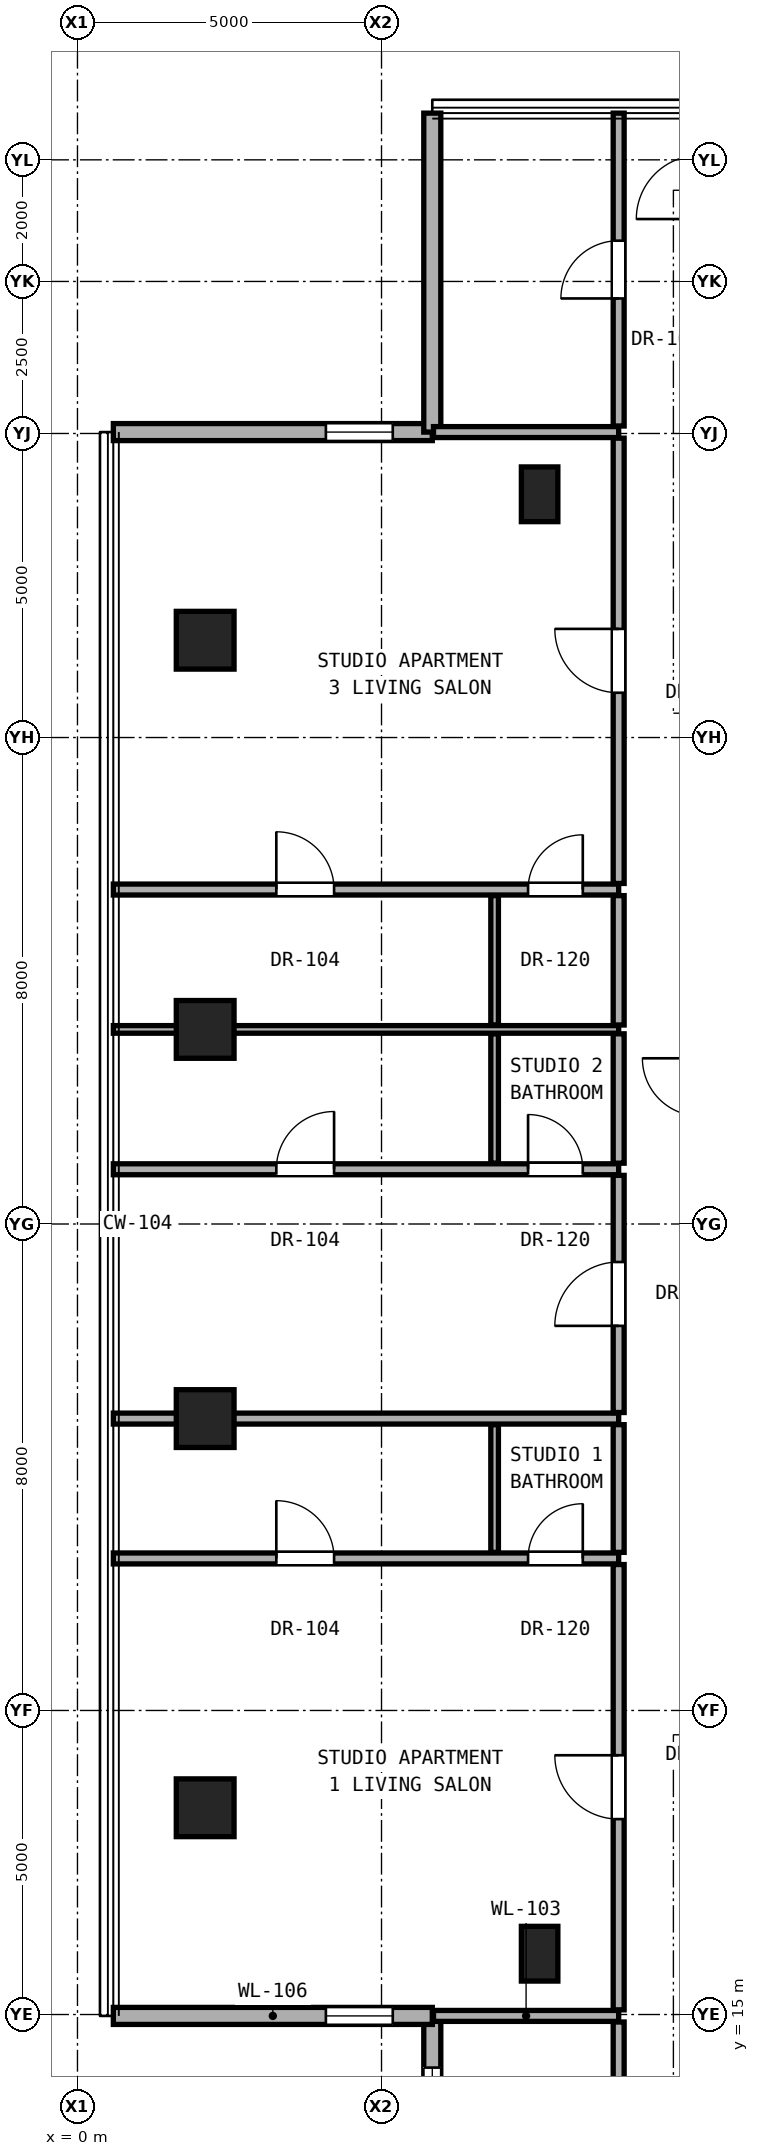
"""IFC4 building model, lengths in metres.
Left out: names, types, materials, properties, quantities, classifications, styles, units other than length and angle.
Written with IfcOpenShell. Run it as: python <this file> out.ifc"""

import sys

from ifc_helpers import new_model, si_unit, direction, frame, frame_2d, origin, origin_2d, place, context, subcontext, project, spatial, rectangle, hollow_rectangle, extrude, element, fill, save


model = new_model("IFC4")
c1 = context("Model", 3, precision=1e-05, world=origin(), true_north=direction((0.0, 1.0)))
c2 = subcontext(c1, "Body", "Model", "MODEL_VIEW")
j1 = project(units=[si_unit("LENGTHUNIT", "METRE"), si_unit("PLANEANGLEUNIT", "RADIAN")], contexts=[c1])
p1 = place(None, origin())
s1 = spatial("IfcSite", under=j1, at=p1, CompositionType="ELEMENT")
p2 = place(p1, origin())
s2 = spatial("IfcBuilding", under=s1, at=p2, CompositionType="ELEMENT")
p3 = place(p2, frame((0.0, 0.0, 157.65)))
s3 = spatial("IfcBuildingStorey", under=s2, at=p3, CompositionType="ELEMENT", Elevation=157.65)
for number, where, z_axis, x_axis in (
    (1, (2.1, 18.4, 0.0), (0.0, 0.0, 1.0), (1.0, 0.0, 0.0)),
    (2, (2.1, 24.8, 0.0), (0.0, 0.0, 1.0), (1.0, 0.0, 0.0)),
    (3, (2.1, 31.2, 0.0), (0.0, 0.0, 1.0), (1.0, 0.0, 0.0)),
    (4, (2.1, 37.6, 0.0), (0.0, 0.0, 1.0), (1.0, 0.0, 0.0)),
):
    element("IfcColumn", number, at=place(p3, frame(where, z_axis=z_axis, x_axis=x_axis)), inside=s3, PredefinedType="COLUMN", context=c2, shape_type="SweptSolid", body=[
        extrude(hollow_rectangle(XDim=0.95, YDim=0.95, WallThickness=0.05, at=origin_2d()), origin(), (0.0, 0.0, 1.0), 3.25),
    ])
for number, where, z_axis, x_axis in (
    (5, (7.6, 16.0, 0.0), (0.0, 0.0, 1.0), (1.0, 0.0, 0.0)),
    (6, (7.6, 40.0, 0.0), (0.0, 0.0, 1.0), (1.0, 0.0, 0.0)),
):
    element("IfcColumn", number, at=place(p3, frame(where, z_axis=z_axis, x_axis=x_axis)), inside=s3, PredefinedType="PILASTER", context=c2, shape_type="SweptSolid", body=[
        extrude(rectangle(XDim=0.6, YDim=0.9, at=origin_2d()), origin(), (0.0, 0.0, 1.0), 3.25),
    ])
p4 = place(p3, frame((5.835, 14.977, 0.0), z_axis=(0.0, 0.0, 1.0), x_axis=(0.0, -1.0, 0.0)))
e7 = element("IfcWall", 7, at=p4, inside=s3, PredefinedType="SOLIDWALL", context=c2, shape_type="SweptSolid", body=[
    extrude(rectangle(XDim=5.245, YDim=0.28, at=frame_2d((2.623, 0.0))), origin(), (0.0, 0.0, 1.0), 3.03),
])
p5 = place(p4, frame((0.85, 0.0, 0.68)))
e8 = element("IfcOpeningElement", 8, at=p5, cuts=e7, PredefinedType="OPENING", context=c2, shape_type="SweptSolid", body=[
    extrude(rectangle(XDim=2.1, YDim=2.2, at=frame_2d((1.05, 1.1))), frame((0.0, 0.15, 0.0), z_axis=(0.0, -1.0, 0.0), x_axis=(1.0, 0.0, 0.0)), (0.0, 0.0, 1.0), 0.3),
])
p6 = place(p3, frame((0.59, 14.977, 0.0), z_axis=(0.0, 0.0, 1.0), x_axis=(1.0, 0.0, 0.0)))
e9 = element("IfcWall", 9, at=p6, inside=s3, PredefinedType="SOLIDWALL", context=c2, shape_type="SweptSolid", body=[
    extrude(rectangle(XDim=5.245, YDim=0.28, at=frame_2d((2.623, 0.0))), origin(), (0.0, 0.0, 1.0), 3.03),
])
p7 = place(p6, frame((3.495, 0.0, 0.85)))
e10 = element("IfcOpeningElement", 10, at=p7, cuts=e9, PredefinedType="OPENING", context=c2, shape_type="SweptSolid", body=[
    extrude(rectangle(XDim=1.1, YDim=2.0, at=frame_2d((0.55, 1.0))), frame((0.0, 0.15, 0.0), z_axis=(0.0, -1.0, 0.0), x_axis=(1.0, 0.0, 0.0)), (0.0, 0.0, 1.0), 0.3),
])
p8 = place(p3, frame((5.835, 41.023, 0.0), z_axis=(0.0, 0.0, 1.0), x_axis=(-1.0, 0.0, 0.0)))
e11 = element("IfcWall", 11, at=p8, inside=s3, PredefinedType="SOLIDWALL", context=c2, shape_type="SweptSolid", body=[
    extrude(rectangle(XDim=5.245, YDim=0.28, at=frame_2d((2.623, 0.0))), origin(), (0.0, 0.0, 1.0), 3.03),
])
p9 = place(p8, frame((0.65, 0.0, 0.85)))
e12 = element("IfcOpeningElement", 12, at=p9, cuts=e11, PredefinedType="OPENING", context=c2, shape_type="SweptSolid", body=[
    extrude(rectangle(XDim=1.1, YDim=2.0, at=frame_2d((0.55, 1.0))), frame((0.0, 0.15, 0.0), z_axis=(0.0, -1.0, 0.0), x_axis=(1.0, 0.0, 0.0)), (0.0, 0.0, 1.0), 0.3),
])
p10 = place(p3, frame((5.835, 46.268, 0.0), z_axis=(0.0, 0.0, 1.0), x_axis=(0.0, -1.0, 0.0)))
e13 = element("IfcWall", 13, at=p10, inside=s3, PredefinedType="SOLIDWALL", context=c2, shape_type="SweptSolid", body=[
    extrude(rectangle(XDim=5.245, YDim=0.28, at=frame_2d((2.623, 0.0))), origin(), (0.0, 0.0, 1.0), 3.03),
])
p11 = place(p3, frame((5.855, 14.977, 0.0), z_axis=(0.0, 0.0, 1.0), x_axis=(1.0, 0.0, 0.0)))
e14 = element("IfcWall", 14, at=p11, inside=s3, PredefinedType="PARTITIONING", context=c2, shape_type="SweptSolid", body=[
    extrude(rectangle(XDim=3.045, YDim=0.18, at=frame_2d((1.522, 0.0))), origin(), (0.0, 0.0, 1.0), 3.05),
])
p12 = place(p3, frame((0.59, 22.5, 0.0), z_axis=(0.0, 0.0, 1.0), x_axis=(1.0, 0.0, 0.0)))
e15 = element("IfcWall", 15, at=p12, inside=s3, PredefinedType="PARTITIONING", context=c2, shape_type="SweptSolid", body=[
    extrude(rectangle(XDim=8.31, YDim=0.18, at=frame_2d((4.155, 0.0))), origin(), (0.0, 0.0, 1.0), 2.269),
])
p13 = place(p12, frame((2.68, 0.0, 0.0)))
e16 = element("IfcOpeningElement", 16, at=p13, cuts=e15, PredefinedType="OPENING", context=c2, shape_type="SweptSolid", body=[
    extrude(rectangle(XDim=0.95, YDim=2.15, at=frame_2d((0.475, 1.075))), frame((0.0, 0.1, 0.0), z_axis=(0.0, -1.0, 0.0), x_axis=(1.0, 0.0, 0.0)), (0.0, 0.0, 1.0), 0.2),
])
p14 = place(p12, frame((6.82, 0.0, 0.0)))
e17 = element("IfcOpeningElement", 17, at=p14, cuts=e15, PredefinedType="OPENING", context=c2, shape_type="SweptSolid", body=[
    extrude(rectangle(XDim=0.9, YDim=2.1, at=frame_2d((0.45, 1.05))), frame((0.0, 0.1, 0.0), z_axis=(0.0, -1.0, 0.0), x_axis=(1.0, 0.0, 0.0)), (0.0, 0.0, 1.0), 0.2),
])
p15 = place(p3, frame((0.59, 24.8, 0.0), z_axis=(0.0, 0.0, 1.0), x_axis=(1.0, 0.0, 0.0)))
e18 = element("IfcWall", 18, at=p15, inside=s3, PredefinedType="PARTITIONING", context=c2, shape_type="SweptSolid", body=[
    extrude(rectangle(XDim=8.31, YDim=0.18, at=frame_2d((4.155, 0.0))), origin(), (0.0, 0.0, 1.0), 2.269),
])
p16 = place(p3, frame((0.59, 28.9, 0.0), z_axis=(0.0, 0.0, 1.0), x_axis=(1.0, 0.0, 0.0)))
e19 = element("IfcWall", 19, at=p16, inside=s3, PredefinedType="PARTITIONING", context=c2, shape_type="SweptSolid", body=[
    extrude(rectangle(XDim=8.31, YDim=0.18, at=frame_2d((4.155, 0.0))), origin(), (0.0, 0.0, 1.0), 2.269),
])
p17 = place(p16, frame((2.68, 0.0, 0.0)))
e20 = element("IfcOpeningElement", 20, at=p17, cuts=e19, PredefinedType="OPENING", context=c2, shape_type="SweptSolid", body=[
    extrude(rectangle(XDim=0.95, YDim=2.15, at=frame_2d((0.475, 1.075))), frame((0.0, 0.1, 0.0), z_axis=(0.0, -1.0, 0.0), x_axis=(1.0, 0.0, 0.0)), (0.0, 0.0, 1.0), 0.2),
])
p18 = place(p16, frame((6.82, 0.0, 0.0)))
e21 = element("IfcOpeningElement", 21, at=p18, cuts=e19, PredefinedType="OPENING", context=c2, shape_type="SweptSolid", body=[
    extrude(rectangle(XDim=0.9, YDim=2.1, at=frame_2d((0.45, 1.05))), frame((0.0, 0.1, 0.0), z_axis=(0.0, -1.0, 0.0), x_axis=(1.0, 0.0, 0.0)), (0.0, 0.0, 1.0), 0.2),
])
p19 = place(p3, frame((0.59, 31.2, 0.0), z_axis=(0.0, 0.0, 1.0), x_axis=(1.0, 0.0, 0.0)))
e22 = element("IfcWall", 22, at=p19, inside=s3, PredefinedType="PARTITIONING", context=c2, shape_type="SweptSolid", body=[
    extrude(rectangle(XDim=8.31, YDim=0.125, at=frame_2d((4.155, 0.0))), origin(), (0.0, 0.0, 1.0), 2.269),
])
p20 = place(p3, frame((0.59, 33.5, 0.0), z_axis=(0.0, 0.0, 1.0), x_axis=(1.0, 0.0, 0.0)))
e23 = element("IfcWall", 23, at=p20, inside=s3, PredefinedType="PARTITIONING", context=c2, shape_type="SweptSolid", body=[
    extrude(rectangle(XDim=8.31, YDim=0.18, at=frame_2d((4.155, 0.0))), origin(), (0.0, 0.0, 1.0), 2.269),
])
p21 = place(p20, frame((2.68, 0.0, 0.0)))
e24 = element("IfcOpeningElement", 24, at=p21, cuts=e23, PredefinedType="OPENING", context=c2, shape_type="SweptSolid", body=[
    extrude(rectangle(XDim=0.95, YDim=2.15, at=frame_2d((0.475, 1.075))), frame((0.0, 0.1, 0.0), z_axis=(0.0, -1.0, 0.0), x_axis=(1.0, 0.0, 0.0)), (0.0, 0.0, 1.0), 0.2),
])
p22 = place(p20, frame((6.82, 0.0, 0.0)))
e25 = element("IfcOpeningElement", 25, at=p22, cuts=e23, PredefinedType="OPENING", context=c2, shape_type="SweptSolid", body=[
    extrude(rectangle(XDim=0.9, YDim=2.1, at=frame_2d((0.45, 1.05))), frame((0.0, 0.1, 0.0), z_axis=(0.0, -1.0, 0.0), x_axis=(1.0, 0.0, 0.0)), (0.0, 0.0, 1.0), 0.2),
])
p23 = place(p3, frame((5.855, 41.023, 0.0), z_axis=(0.0, 0.0, 1.0), x_axis=(1.0, 0.0, 0.0)))
e26 = element("IfcWall", 26, at=p23, inside=s3, PredefinedType="PARTITIONING", context=c2, shape_type="SweptSolid", body=[
    extrude(rectangle(XDim=3.045, YDim=0.18, at=frame_2d((1.522, 0.0))), origin(), (0.0, 0.0, 1.0), 3.05),
])
p24 = place(p3, frame((6.86, 22.6, 0.0), z_axis=(0.0, 0.0, 1.0), x_axis=(0.0, 1.0, 0.0)))
e27 = element("IfcWall", 27, at=p24, inside=s3, PredefinedType="PARTITIONING", context=c2, shape_type="SweptSolid", body=[
    extrude(rectangle(XDim=2.1, YDim=0.125, at=frame_2d((1.05, 0.0))), origin(), (0.0, 0.0, 1.0), 2.346),
])
for number, where, z_axis, x_axis in (
    (28, (6.86, 29.0, 0.0), (0.0, 0.0, 1.0), (0.0, 1.0, 0.0)),
    (29, (6.86, 31.272, 0.0), (0.0, 0.0, 1.0), (0.0, 1.0, 0.0)),
):
    element("IfcWall", number, at=place(p3, frame(where, z_axis=z_axis, x_axis=x_axis)), inside=s3, PredefinedType="PARTITIONING", context=c2, shape_type="SweptSolid", body=[
        extrude(rectangle(XDim=2.127, YDim=0.125, at=frame_2d((1.064, 0.0))), origin(), (0.0, 0.0, 1.0), 2.346),
    ])
p25 = place(p3, frame((8.9, 9.732, 0.0), z_axis=(0.0, 0.0, 1.0), x_axis=(0.0, 1.0, 0.0)))
e30 = element("IfcWall", 30, at=p25, inside=s3, PredefinedType="PARTITIONING", context=c2, shape_type="SweptSolid", body=[
    extrude(rectangle(XDim=5.145, YDim=0.18, at=frame_2d((2.573, 0.0))), origin(), (0.0, 0.0, 1.0), 3.05),
])
p26 = place(p25, frame((2.097, 0.0, 0.0)))
e31 = element("IfcOpeningElement", 31, at=p26, cuts=e30, PredefinedType="OPENING", context=c2, shape_type="SweptSolid", body=[
    extrude(rectangle(XDim=0.95, YDim=2.15, at=frame_2d((0.475, 1.075))), frame((0.0, 0.1, 0.0), z_axis=(0.0, -1.0, 0.0), x_axis=(1.0, 0.0, 0.0)), (0.0, 0.0, 1.0), 0.2),
])
p27 = place(p3, frame((8.9, 15.077, 0.0), z_axis=(0.0, 0.0, 1.0), x_axis=(0.0, 1.0, 0.0)))
e32 = element("IfcWall", 32, at=p27, inside=s3, PredefinedType="PARTITIONING", context=c2, shape_type="SweptSolid", body=[
    extrude(rectangle(XDim=7.323, YDim=0.18, at=frame_2d((3.662, 0.0))), origin(), (0.0, 0.0, 1.0), 2.442),
])
p28 = place(p27, frame((3.136, 0.0, 0.0)))
e33 = element("IfcOpeningElement", 33, at=p28, cuts=e32, PredefinedType="OPENING", context=c2, shape_type="SweptSolid", body=[
    extrude(rectangle(XDim=1.05, YDim=2.2, at=frame_2d((0.525, 1.1))), frame((0.0, 0.1, 0.0), z_axis=(0.0, -1.0, 0.0), x_axis=(1.0, 0.0, 0.0)), (0.0, 0.0, 1.0), 0.2),
])
p29 = place(p3, frame((8.9, 22.6, 0.0), z_axis=(0.0, 0.0, 1.0), x_axis=(0.0, 1.0, 0.0)))
e34 = element("IfcWall", 34, at=p29, inside=s3, PredefinedType="PARTITIONING", context=c2, shape_type="SweptSolid", body=[
    extrude(rectangle(XDim=2.1, YDim=0.18, at=frame_2d((1.05, 0.0))), origin(), (0.0, 0.0, 1.0), 2.346),
])
p30 = place(p3, frame((8.9, 24.9, 0.0), z_axis=(0.0, 0.0, 1.0), x_axis=(0.0, 1.0, 0.0)))
e35 = element("IfcWall", 35, at=p30, inside=s3, PredefinedType="PARTITIONING", context=c2, shape_type="SweptSolid", body=[
    extrude(rectangle(XDim=3.9, YDim=0.18, at=frame_2d((1.95, 0.0))), origin(), (0.0, 0.0, 1.0), 2.346),
])
p31 = place(p30, frame((1.425, 0.0, 0.0)))
e36 = element("IfcOpeningElement", 36, at=p31, cuts=e35, PredefinedType="OPENING", context=c2, shape_type="SweptSolid", body=[
    extrude(rectangle(XDim=1.05, YDim=2.2, at=frame_2d((0.525, 1.1))), frame((0.0, 0.1, 0.0), z_axis=(0.0, -1.0, 0.0), x_axis=(1.0, 0.0, 0.0)), (0.0, 0.0, 1.0), 0.2),
])
for number, where, z_axis, x_axis in (
    (37, (8.9, 29.0, 0.0), (0.0, 0.0, 1.0), (0.0, 1.0, 0.0)),
    (38, (8.9, 31.272, 0.0), (0.0, 0.0, 1.0), (0.0, 1.0, 0.0)),
):
    element("IfcWall", number, at=place(p3, frame(where, z_axis=z_axis, x_axis=x_axis)), inside=s3, PredefinedType="PARTITIONING", context=c2, shape_type="SweptSolid", body=[
        extrude(rectangle(XDim=2.127, YDim=0.18, at=frame_2d((1.064, 0.0))), origin(), (0.0, 0.0, 1.0), 2.346),
    ])
p32 = place(p3, frame((8.9, 33.6, 0.0), z_axis=(0.0, 0.0, 1.0), x_axis=(0.0, 1.0, 0.0)))
e39 = element("IfcWall", 39, at=p32, inside=s3, PredefinedType="PARTITIONING", context=c2, shape_type="SweptSolid", body=[
    extrude(rectangle(XDim=7.323, YDim=0.18, at=frame_2d((3.662, 0.0))), origin(), (0.0, 0.0, 1.0), 2.442),
])
p33 = place(p32, frame((3.136, 0.0, 0.0)))
e40 = element("IfcOpeningElement", 40, at=p33, cuts=e39, PredefinedType="OPENING", context=c2, shape_type="SweptSolid", body=[
    extrude(rectangle(XDim=1.05, YDim=2.2, at=frame_2d((0.525, 1.1))), frame((0.0, 0.1, 0.0), z_axis=(0.0, -1.0, 0.0), x_axis=(1.0, 0.0, 0.0)), (0.0, 0.0, 1.0), 0.2),
])
p34 = place(p3, frame((8.9, 41.123, 0.0), z_axis=(0.0, 0.0, 1.0), x_axis=(0.0, 1.0, 0.0)))
e41 = element("IfcWall", 41, at=p34, inside=s3, PredefinedType="PARTITIONING", context=c2, shape_type="SweptSolid", body=[
    extrude(rectangle(XDim=5.145, YDim=0.18, at=frame_2d((2.573, 0.0))), origin(), (0.0, 0.0, 1.0), 3.05),
])
p35 = place(p34, frame((2.097, 0.0, 0.0)))
e42 = element("IfcOpeningElement", 42, at=p35, cuts=e41, PredefinedType="OPENING", context=c2, shape_type="SweptSolid", body=[
    extrude(rectangle(XDim=0.95, YDim=2.15, at=frame_2d((0.475, 1.075))), frame((0.0, 0.1, 0.0), z_axis=(0.0, -1.0, 0.0), x_axis=(1.0, 0.0, 0.0)), (0.0, 0.0, 1.0), 0.2),
])
p36 = place(p5, origin())
e43 = element("IfcWindow", 43, at=p36, inside=s3, PartitioningType="SINGLE_PANEL", PredefinedType="WINDOW", context=c2, shape_type="SweptSolid", body=[
    extrude(rectangle(XDim=2.1, YDim=2.2, at=frame_2d((1.05, 1.1))), frame((0.0, 0.03, 0.0), z_axis=(0.0, -1.0, 0.0), x_axis=(1.0, 0.0, 0.0)), (0.0, 0.0, 1.0), 0.06),
])
fill(e8, e43)
p37 = place(p7, origin())
e44 = element("IfcWindow", 44, at=p37, inside=s3, PartitioningType="SINGLE_PANEL", PredefinedType="WINDOW", context=c2, shape_type="SweptSolid", body=[
    extrude(rectangle(XDim=1.1, YDim=2.0, at=frame_2d((0.55, 1.0))), frame((0.0, 0.03, 0.0), z_axis=(0.0, -1.0, 0.0), x_axis=(1.0, 0.0, 0.0)), (0.0, 0.0, 1.0), 0.06),
])
fill(e10, e44)
p38 = place(p9, origin())
e45 = element("IfcWindow", 45, at=p38, inside=s3, PartitioningType="SINGLE_PANEL", PredefinedType="WINDOW", context=c2, shape_type="SweptSolid", body=[
    extrude(rectangle(XDim=1.1, YDim=2.0, at=frame_2d((0.55, 1.0))), frame((0.0, 0.03, 0.0), z_axis=(0.0, -1.0, 0.0), x_axis=(1.0, 0.0, 0.0)), (0.0, 0.0, 1.0), 0.06),
])
fill(e12, e45)
p39 = place(p28, origin())
e46 = element("IfcDoor", 46, at=p39, inside=s3, OperationType="SINGLE_SWING_RIGHT", PredefinedType="DOOR", context=c2, shape_type="SweptSolid", body=[
    extrude(rectangle(XDim=1.05, YDim=2.2, at=frame_2d((0.525, 1.1))), frame((0.0, 0.025, 0.0), z_axis=(0.0, -1.0, 0.0), x_axis=(1.0, 0.0, 0.0)), (0.0, 0.0, 1.0), 0.05),
])
fill(e33, e46)
p40 = place(p13, origin())
e47 = element("IfcDoor", 47, at=p40, inside=s3, OperationType="SINGLE_SWING_LEFT", PredefinedType="DOOR", context=c2, shape_type="SweptSolid", body=[
    extrude(rectangle(XDim=0.95, YDim=2.15, at=frame_2d((0.475, 1.075))), frame((0.0, 0.025, 0.0), z_axis=(0.0, -1.0, 0.0), x_axis=(1.0, 0.0, 0.0)), (0.0, 0.0, 1.0), 0.05),
])
fill(e16, e47)
p41 = place(p14, origin())
e48 = element("IfcDoor", 48, at=p41, inside=s3, OperationType="SINGLE_SWING_RIGHT", PredefinedType="DOOR", context=c2, shape_type="SweptSolid", body=[
    extrude(rectangle(XDim=0.9, YDim=2.1, at=frame_2d((0.45, 1.05))), frame((0.0, 0.025, 0.0), z_axis=(0.0, -1.0, 0.0), x_axis=(1.0, 0.0, 0.0)), (0.0, 0.0, 1.0), 0.05),
])
fill(e17, e48)
p42 = place(p31, origin())
e49 = element("IfcDoor", 49, at=p42, inside=s3, OperationType="SINGLE_SWING_LEFT", PredefinedType="DOOR", context=c2, shape_type="SweptSolid", body=[
    extrude(rectangle(XDim=1.05, YDim=2.2, at=frame_2d((0.525, 1.1))), frame((0.0, 0.025, 0.0), z_axis=(0.0, -1.0, 0.0), x_axis=(1.0, 0.0, 0.0)), (0.0, 0.0, 1.0), 0.05),
])
fill(e36, e49)
p43 = place(p17, origin())
e50 = element("IfcDoor", 50, at=p43, inside=s3, OperationType="SINGLE_SWING_RIGHT", PredefinedType="DOOR", context=c2, shape_type="SweptSolid", body=[
    extrude(rectangle(XDim=0.95, YDim=2.15, at=frame_2d((0.475, 1.075))), frame((0.0, 0.025, 0.0), z_axis=(0.0, -1.0, 0.0), x_axis=(1.0, 0.0, 0.0)), (0.0, 0.0, 1.0), 0.05),
])
fill(e20, e50)
p44 = place(p18, origin())
e51 = element("IfcDoor", 51, at=p44, inside=s3, OperationType="SINGLE_SWING_LEFT", PredefinedType="DOOR", context=c2, shape_type="SweptSolid", body=[
    extrude(rectangle(XDim=0.9, YDim=2.1, at=frame_2d((0.45, 1.05))), frame((0.0, 0.025, 0.0), z_axis=(0.0, -1.0, 0.0), x_axis=(1.0, 0.0, 0.0)), (0.0, 0.0, 1.0), 0.05),
])
fill(e21, e51)
p45 = place(p33, origin())
e52 = element("IfcDoor", 52, at=p45, inside=s3, OperationType="SINGLE_SWING_RIGHT", PredefinedType="DOOR", context=c2, shape_type="SweptSolid", body=[
    extrude(rectangle(XDim=1.05, YDim=2.2, at=frame_2d((0.525, 1.1))), frame((0.0, 0.025, 0.0), z_axis=(0.0, -1.0, 0.0), x_axis=(1.0, 0.0, 0.0)), (0.0, 0.0, 1.0), 0.05),
])
fill(e40, e52)
p46 = place(p21, origin())
e53 = element("IfcDoor", 53, at=p46, inside=s3, OperationType="SINGLE_SWING_LEFT", PredefinedType="DOOR", context=c2, shape_type="SweptSolid", body=[
    extrude(rectangle(XDim=0.95, YDim=2.15, at=frame_2d((0.475, 1.075))), frame((0.0, 0.025, 0.0), z_axis=(0.0, -1.0, 0.0), x_axis=(1.0, 0.0, 0.0)), (0.0, 0.0, 1.0), 0.05),
])
fill(e24, e53)
p47 = place(p22, origin())
e54 = element("IfcDoor", 54, at=p47, inside=s3, OperationType="SINGLE_SWING_RIGHT", PredefinedType="DOOR", context=c2, shape_type="SweptSolid", body=[
    extrude(rectangle(XDim=0.9, YDim=2.1, at=frame_2d((0.45, 1.05))), frame((0.0, 0.025, 0.0), z_axis=(0.0, -1.0, 0.0), x_axis=(1.0, 0.0, 0.0)), (0.0, 0.0, 1.0), 0.05),
])
fill(e25, e54)
p48 = place(p35, origin())
e55 = element("IfcDoor", 55, at=p48, inside=s3, OperationType="SINGLE_SWING_LEFT", PredefinedType="DOOR", context=c2, shape_type="SweptSolid", body=[
    extrude(rectangle(XDim=0.95, YDim=2.15, at=frame_2d((0.475, 1.075))), frame((0.0, 0.025, 0.0), z_axis=(0.0, -1.0, 0.0), x_axis=(1.0, 0.0, 0.0)), (0.0, 0.0, 1.0), 0.05),
])
fill(e42, e55)
save(model, sys.argv[1])
